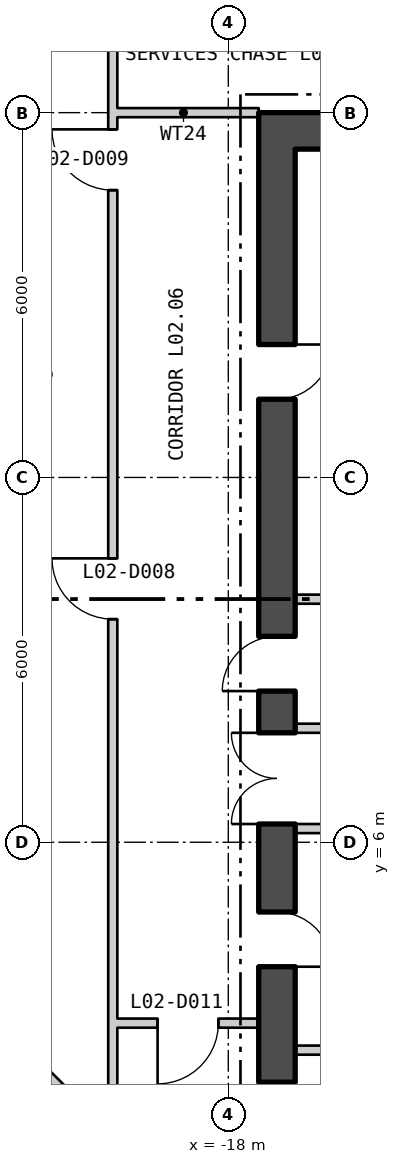
"""IFC4 building model, lengths in metres.
Left out: names, types, materials, properties, quantities, classifications, styles, units other than length and angle.
Written with IfcOpenShell. Run it as: python <this file> out.ifc"""

import sys

from ifc_helpers import new_model, si_unit, direction, frame, frame_2d, origin, place, context, subcontext, project, spatial, rectangle, extrude, element, fill, save


model = new_model("IFC4")
c1 = context("Model", 3, precision=1e-05, world=origin(), true_north=direction((0.0, 1.0)))
c2 = subcontext(c1, "Body", "Model", "MODEL_VIEW")
j1 = project(units=[si_unit("LENGTHUNIT", "METRE"), si_unit("PLANEANGLEUNIT", "RADIAN")], contexts=[c1])
p1 = place(None, origin())
s1 = spatial("IfcSite", under=j1, at=p1, CompositionType="ELEMENT")
p2 = place(p1, origin())
s2 = spatial("IfcBuilding", under=s1, at=p2, CompositionType="ELEMENT")
p3 = place(p2, frame((0.0, 0.0, 13.5)))
s3 = spatial("IfcBuildingStorey", under=s2, at=p3, CompositionType="ELEMENT", Elevation=13.5)
p4 = place(p3, frame((-17.5, 17.7, 0.0), z_axis=(0.0, 0.0, 1.0), x_axis=(1.0, 0.0, 0.0)))
e1 = element("IfcWall", 1, at=p4, inside=s3, PredefinedType="SHEAR", context=c2, shape_type="SweptSolid", body=[
    extrude(rectangle(XDim=35.0, YDim=0.6, at=frame_2d((17.5, 0.0))), origin(), (0.0, 0.0, 1.0), 4.88),
])
p5 = place(p3, frame((-17.2, 0.6, 0.0), z_axis=(0.0, 0.0, 1.0), x_axis=(0.0, 1.0, 0.0)))
e2 = element("IfcWall", 2, at=p5, inside=s3, PredefinedType="SHEAR", context=c2, shape_type="SweptSolid", body=[
    extrude(rectangle(XDim=16.8, YDim=0.6, at=frame_2d((8.4, 0.0))), origin(), (0.0, 0.0, 1.0), 4.88),
])
p6 = place(p5, frame((5.7, 0.0, 0.0)))
e3 = element("IfcOpeningElement", 3, at=p6, cuts=e2, PredefinedType="OPENING", context=c2, shape_type="SweptSolid", body=[
    extrude(rectangle(XDim=1.5, YDim=2.1, at=frame_2d((0.75, 1.05))), frame((0.0, 0.31, 0.0), z_axis=(0.0, -1.0, 0.0), x_axis=(1.0, 0.0, 0.0)), (0.0, 0.0, 1.0), 0.62),
])
p7 = place(p5, frame((0.453, 0.0, 0.0)))
e4 = element("IfcOpeningElement", 4, at=p7, cuts=e2, PredefinedType="OPENING", context=c2, shape_type="SweptSolid", body=[
    extrude(rectangle(XDim=1.0, YDim=2.1, at=frame_2d((0.5, 1.05))), frame((0.0, 0.31, 0.0), z_axis=(0.0, -1.0, 0.0), x_axis=(1.0, 0.0, 0.0)), (0.0, 0.0, 1.0), 0.62),
])
p8 = place(p5, frame((3.353, 0.0, 0.0)))
e5 = element("IfcOpeningElement", 5, at=p8, cuts=e2, PredefinedType="OPENING", context=c2, shape_type="SweptSolid", body=[
    extrude(rectangle(XDim=0.9, YDim=2.1, at=frame_2d((0.45, 1.05))), frame((0.0, 0.31, 0.0), z_axis=(0.0, -1.0, 0.0), x_axis=(1.0, 0.0, 0.0)), (0.0, 0.0, 1.0), 0.62),
])
p9 = place(p5, frame((7.886, 0.0, 0.0)))
e6 = element("IfcOpeningElement", 6, at=p9, cuts=e2, PredefinedType="OPENING", context=c2, shape_type="SweptSolid", body=[
    extrude(rectangle(XDim=0.9, YDim=2.1, at=frame_2d((0.45, 1.05))), frame((0.0, 0.31, 0.0), z_axis=(0.0, -1.0, 0.0), x_axis=(1.0, 0.0, 0.0)), (0.0, 0.0, 1.0), 0.62),
])
p10 = place(p5, frame((12.686, 0.0, 0.0)))
e7 = element("IfcOpeningElement", 7, at=p10, cuts=e2, PredefinedType="OPENING", context=c2, shape_type="SweptSolid", body=[
    extrude(rectangle(XDim=0.9, YDim=2.1, at=frame_2d((0.45, 1.05))), frame((0.0, 0.31, 0.0), z_axis=(0.0, -1.0, 0.0), x_axis=(1.0, 0.0, 0.0)), (0.0, 0.0, 1.0), 0.62),
])
for number, where, z_axis, x_axis in (
    (8, (-16.9, 6.225, 0.0), (0.0, 0.0, 1.0), (1.0, 0.0, 0.0)),
    (9, (-16.9, 7.875, 0.0), (0.0, 0.0, 1.0), (1.0, 0.0, 0.0)),
    (10, (-16.9, 2.581, 0.0), (0.0, 0.0, 1.0), (1.0, 0.0, 0.0)),
    (11, (-16.9, 9.998, 0.0), (0.0, 0.0, 1.0), (1.0, 0.0, 0.0)),
):
    element("IfcWall", number, at=place(p3, frame(where, z_axis=z_axis, x_axis=x_axis)), inside=s3, PredefinedType="PARTITIONING", context=c2, shape_type="SweptSolid", body=[
        extrude(rectangle(XDim=2.4, YDim=0.15, at=frame_2d((1.2, 0.0))), origin(), (0.0, 0.0, 1.0), 4.88),
    ])
p11 = place(p3, frame((-25.392, 6.592, 0.0), z_axis=(0.0, 0.0, 1.0), x_axis=(0.707106781187, -0.707106781187, 0.0)))
e12 = element("IfcWall", 12, at=p11, inside=s3, PredefinedType="PARTITIONING", context=c2, shape_type="SweptSolid", body=[
    extrude(rectangle(XDim=7.586, YDim=0.15, at=frame_2d((3.793, 0.0))), origin(), (0.0, 0.0, 1.0), 4.88),
])
p12 = place(p3, frame((-19.975, 18.0, 0.0), z_axis=(0.0, 0.0, 1.0), x_axis=(1.0, 0.0, 0.0)))
e13 = element("IfcWall", 13, at=p12, inside=s3, PredefinedType="PARTITIONING", context=c2, shape_type="SweptSolid", body=[
    extrude(rectangle(XDim=2.475, YDim=0.15, at=frame_2d((1.238, 0.0))), origin(), (0.0, 0.0, 1.0), 4.33),
])
p13 = place(p3, frame((-19.9, 1.025, 0.0), z_axis=(0.0, 0.0, 1.0), x_axis=(0.0, 1.0, 0.0)))
e14 = element("IfcWall", 14, at=p13, inside=s3, PredefinedType="PARTITIONING", context=c2, shape_type="SweptSolid", body=[
    extrude(rectangle(XDim=16.9, YDim=0.15, at=frame_2d((8.45, 0.0))), origin(), (0.0, 0.0, 1.0), 4.88),
])
p14 = place(p13, frame((8.644, 0.0, 0.0)))
e15 = element("IfcOpeningElement", 15, at=p14, cuts=e14, PredefinedType="OPENING", context=c2, shape_type="SweptSolid", body=[
    extrude(rectangle(XDim=1.0, YDim=2.1, at=frame_2d((0.5, 1.05))), frame((0.0, 0.085, 0.0), z_axis=(0.0, -1.0, 0.0), x_axis=(1.0, 0.0, 0.0)), (0.0, 0.0, 1.0), 0.17),
])
p15 = place(p13, frame((15.7, 0.0, 0.0)))
e16 = element("IfcOpeningElement", 16, at=p15, cuts=e14, PredefinedType="OPENING", context=c2, shape_type="SweptSolid", body=[
    extrude(rectangle(XDim=1.0, YDim=2.1, at=frame_2d((0.5, 1.05))), frame((0.0, 0.085, 0.0), z_axis=(0.0, -1.0, 0.0), x_axis=(1.0, 0.0, 0.0)), (0.0, 0.0, 1.0), 0.17),
])
p16 = place(p3, frame((-19.9, 18.075, 0.0), z_axis=(0.0, 0.0, 1.0), x_axis=(0.0, 1.0, 0.0)))
e17 = element("IfcWall", 17, at=p16, inside=s3, PredefinedType="PARTITIONING", context=c2, shape_type="SweptSolid", body=[
    extrude(rectangle(XDim=1.675, YDim=0.15, at=frame_2d((0.838, 0.0))), origin(), (0.0, 0.0, 1.0), 4.88),
])
p17 = place(p3, frame((-19.825, 3.025, 0.0), z_axis=(0.0, 0.0, 1.0), x_axis=(1.0, 0.0, 0.0)))
e18 = element("IfcWall", 18, at=p17, inside=s3, PredefinedType="PARTITIONING", context=c2, shape_type="SweptSolid", body=[
    extrude(rectangle(XDim=2.325, YDim=0.15, at=frame_2d((1.163, 0.0))), origin(), (0.0, 0.0, 1.0), 4.33),
])
p18 = place(p17, frame((0.662, 0.0, 0.0)))
e19 = element("IfcOpeningElement", 19, at=p18, cuts=e18, PredefinedType="OPENING", context=c2, shape_type="SweptSolid", body=[
    extrude(rectangle(XDim=1.0, YDim=2.1, at=frame_2d((0.5, 1.05))), frame((0.0, 0.085, 0.0), z_axis=(0.0, -1.0, 0.0), x_axis=(1.0, 0.0, 0.0)), (0.0, 0.0, 1.0), 0.17),
])
p19 = place(p6, origin())
e20 = element("IfcDoor", 20, at=p19, inside=s3, OperationType="DOUBLE_DOOR_SINGLE_SWING", PredefinedType="DOOR", context=c2, shape_type="SweptSolid", body=[
    extrude(rectangle(XDim=1.5, YDim=2.1, at=frame_2d((0.75, 1.05))), frame((0.0, 0.025, 0.0), z_axis=(0.0, -1.0, 0.0), x_axis=(1.0, 0.0, 0.0)), (0.0, 0.0, 1.0), 0.05),
])
fill(e3, e20)
p20 = place(p7, origin())
e21 = element("IfcDoor", 21, at=p20, inside=s3, OperationType="SINGLE_SWING_LEFT", PredefinedType="DOOR", context=c2, shape_type="SweptSolid", body=[
    extrude(rectangle(XDim=1.0, YDim=2.1, at=frame_2d((0.5, 1.05))), frame((0.0, 0.025, 0.0), z_axis=(0.0, -1.0, 0.0), x_axis=(1.0, 0.0, 0.0)), (0.0, 0.0, 1.0), 0.05),
])
fill(e4, e21)
p21 = place(p8, origin())
e22 = element("IfcDoor", 22, at=p21, inside=s3, OperationType="SINGLE_SWING_LEFT", PredefinedType="DOOR", context=c2, shape_type="SweptSolid", body=[
    extrude(rectangle(XDim=0.9, YDim=2.1, at=frame_2d((0.45, 1.05))), frame((0.0, 0.025, 0.0), z_axis=(0.0, -1.0, 0.0), x_axis=(1.0, 0.0, 0.0)), (0.0, 0.0, 1.0), 0.05),
])
fill(e5, e22)
p22 = place(p9, origin())
e23 = element("IfcDoor", 23, at=p22, inside=s3, OperationType="SINGLE_SWING_RIGHT", PredefinedType="DOOR", context=c2, shape_type="SweptSolid", body=[
    extrude(rectangle(XDim=0.9, YDim=2.1, at=frame_2d((0.45, 1.05))), frame((0.0, 0.025, 0.0), z_axis=(0.0, -1.0, 0.0), x_axis=(1.0, 0.0, 0.0)), (0.0, 0.0, 1.0), 0.05),
])
fill(e6, e23)
p23 = place(p10, origin())
e24 = element("IfcDoor", 24, at=p23, inside=s3, OperationType="SINGLE_SWING_RIGHT", PredefinedType="DOOR", context=c2, shape_type="SweptSolid", body=[
    extrude(rectangle(XDim=0.9, YDim=2.1, at=frame_2d((0.45, 1.05))), frame((0.0, 0.025, 0.0), z_axis=(0.0, -1.0, 0.0), x_axis=(1.0, 0.0, 0.0)), (0.0, 0.0, 1.0), 0.05),
])
fill(e7, e24)
p24 = place(p14, origin())
e25 = element("IfcDoor", 25, at=p24, inside=s3, OperationType="SINGLE_SWING_LEFT", PredefinedType="DOOR", context=c2, shape_type="SweptSolid", body=[
    extrude(rectangle(XDim=1.0, YDim=2.1, at=frame_2d((0.5, 1.05))), frame((0.0, 0.025, 0.0), z_axis=(0.0, -1.0, 0.0), x_axis=(1.0, 0.0, 0.0)), (0.0, 0.0, 1.0), 0.05),
])
fill(e15, e25)
p25 = place(p15, origin())
e26 = element("IfcDoor", 26, at=p25, inside=s3, OperationType="SINGLE_SWING_LEFT", PredefinedType="DOOR", context=c2, shape_type="SweptSolid", body=[
    extrude(rectangle(XDim=1.0, YDim=2.1, at=frame_2d((0.5, 1.05))), frame((0.0, 0.025, 0.0), z_axis=(0.0, -1.0, 0.0), x_axis=(1.0, 0.0, 0.0)), (0.0, 0.0, 1.0), 0.05),
])
fill(e16, e26)
p26 = place(p18, origin())
e27 = element("IfcDoor", 27, at=p26, inside=s3, OperationType="SINGLE_SWING_LEFT", PredefinedType="DOOR", context=c2, shape_type="SweptSolid", body=[
    extrude(rectangle(XDim=1.0, YDim=2.1, at=frame_2d((0.5, 1.05))), frame((0.0, 0.025, 0.0), z_axis=(0.0, -1.0, 0.0), x_axis=(1.0, 0.0, 0.0)), (0.0, 0.0, 1.0), 0.05),
])
fill(e19, e27)
save(model, sys.argv[1])
